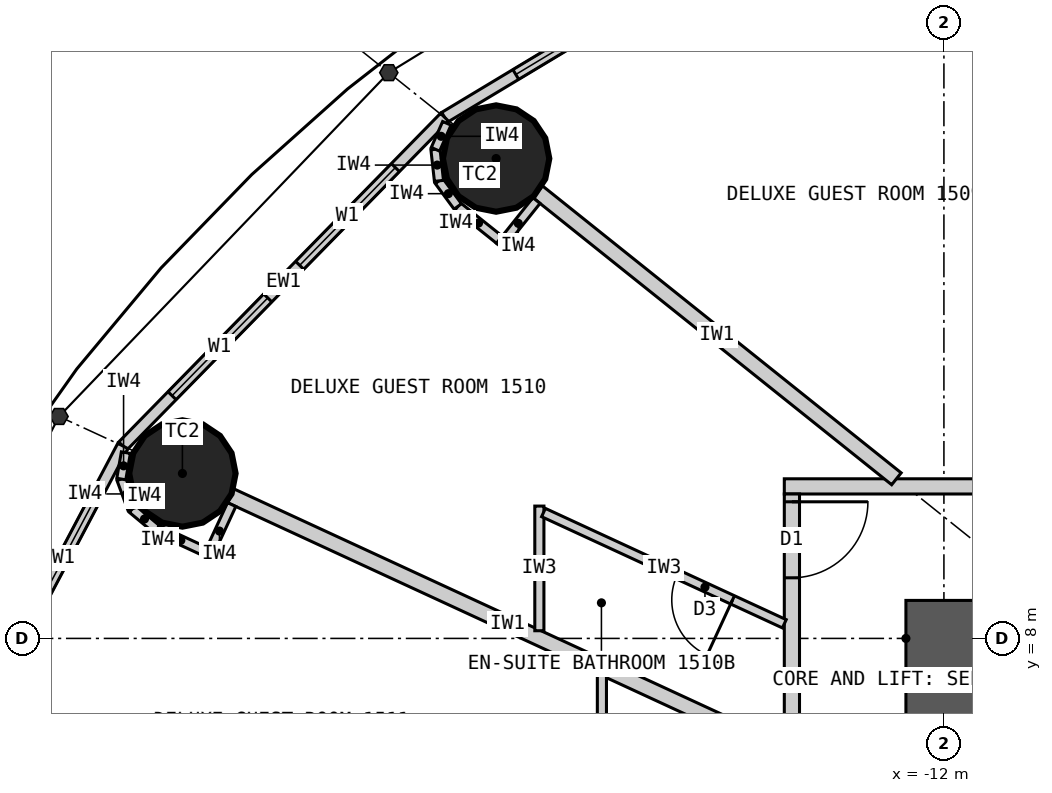
"""IFC4 building model, lengths in metres.
Left out: names, types, materials, properties, quantities, classifications, styles, units other than length and angle.
Written with IfcOpenShell. Run it as: python <this file> out.ifc"""

import sys

from ifc_helpers import new_model, si_unit, direction, frame, frame_2d, origin, origin_2d, place, context, subcontext, project, spatial, rectangle, circle, extrude, element, fill, save


model = new_model("IFC4")
c1 = context("Model", 3, precision=1e-05, world=origin(), true_north=direction((0.0, 1.0)))
c2 = subcontext(c1, "Body", "Model", "MODEL_VIEW")
j1 = project(units=[si_unit("LENGTHUNIT", "METRE"), si_unit("PLANEANGLEUNIT", "RADIAN")], contexts=[c1])
p1 = place(None, origin())
s1 = spatial("IfcSite", under=j1, at=p1, CompositionType="ELEMENT")
p2 = place(p1, origin())
s2 = spatial("IfcBuilding", under=s1, at=p2, CompositionType="ELEMENT")
p3 = place(p2, frame((0.0, 0.0, 63.9)))
s3 = spatial("IfcBuildingStorey", under=s2, at=p3, CompositionType="ELEMENT", Elevation=63.9)
for number, where, z_axis, x_axis in (
    (1, (-17.892, 14.313, 0.0), (0.0, 0.0, 1.0), (1.0, 0.0, 0.0)),
    (2, (-22.019, 10.17, 0.0), (0.0, 0.0, 1.0), (1.0, 0.0, 0.0)),
):
    element("IfcColumn", number, at=place(p3, frame(where, z_axis=z_axis, x_axis=x_axis)), inside=s3, PredefinedType="COLUMN", context=c2, shape_type="SweptSolid", body=[
        extrude(circle(Radius=0.7, at=origin_2d()), origin(), (0.0, 0.0, 1.0), 3.3),
    ])
p4 = place(p3, frame((-12.5, 8.0, 0.0), z_axis=(0.0, 0.0, 1.0), x_axis=(1.0, 0.0, 0.0)))
e3 = element("IfcWall", 3, at=p4, inside=s3, PredefinedType="SHEAR", context=c2, shape_type="SweptSolid", body=[
    extrude(rectangle(XDim=25.0, YDim=1.0, at=frame_2d((12.5, 0.0))), origin(), (0.0, 0.0, 1.0), 3.3),
])
p5 = place(p4, frame((11.2, 0.0, 0.0)))
e4 = element("IfcOpeningElement", 4, at=p5, cuts=e3, PredefinedType="OPENING", context=c2, shape_type="SweptSolid", body=[
    extrude(rectangle(XDim=1.2, YDim=2.2, at=frame_2d((0.6, 1.1))), frame((0.0, 0.51, 0.0), z_axis=(0.0, -1.0, 0.0), x_axis=(1.0, 0.0, 0.0)), (0.0, 0.0, 1.0), 1.02),
])
p6 = place(p4, frame((18.8, 0.0, 0.0)))
e5 = element("IfcOpeningElement", 5, at=p6, cuts=e3, PredefinedType="OPENING", context=c2, shape_type="SweptSolid", body=[
    extrude(rectangle(XDim=0.9, YDim=2.2, at=frame_2d((0.45, 1.1))), frame((0.0, 0.51, 0.0), z_axis=(0.0, -1.0, 0.0), x_axis=(1.0, 0.0, 0.0)), (0.0, 0.0, 1.0), 1.02),
])
p7 = place(p3, frame((-12.0, 7.5, 0.0), z_axis=(0.0, 0.0, 1.0), x_axis=(0.0, -1.0, 0.0)))
e6 = element("IfcWall", 6, at=p7, inside=s3, PredefinedType="SHEAR", context=c2, shape_type="SweptSolid", body=[
    extrude(rectangle(XDim=15.0, YDim=1.0, at=frame_2d((7.5, 0.0))), origin(), (0.0, 0.0, 1.0), 3.3),
])
p8 = place(p7, frame((6.6, 0.0, 0.0)))
e7 = element("IfcOpeningElement", 7, at=p8, cuts=e6, PredefinedType="OPENING", context=c2, shape_type="SweptSolid", body=[
    extrude(rectangle(XDim=1.8, YDim=2.2, at=frame_2d((0.9, 1.1))), frame((0.0, 0.51, 0.0), z_axis=(0.0, -1.0, 0.0), x_axis=(1.0, 0.0, 0.0)), (0.0, 0.0, 1.0), 1.02),
])
p9 = place(p3, frame((-13.096, 18.147, 0.0), z_axis=(0.0, 0.0, 1.0), x_axis=(-0.856983180864, -0.515344377787, 0.0)))
e8 = element("IfcWall", 8, at=p9, inside=s3, PredefinedType="ELEMENTEDWALL", context=c2, shape_type="SweptSolid", body=[
    extrude(rectangle(XDim=6.386, YDim=0.15, at=frame_2d((3.193, 0.0))), origin(), (0.0, 0.0, 1.0), 3.12),
])
p10 = place(p9, frame((1.093, 0.0, 0.9)))
e9 = element("IfcOpeningElement", 9, at=p10, cuts=e8, PredefinedType="OPENING", context=c2, shape_type="SweptSolid", body=[
    extrude(rectangle(XDim=1.8, YDim=1.9, at=frame_2d((0.9, 0.95))), frame((0.0, 0.085, 0.0), z_axis=(0.0, -1.0, 0.0), x_axis=(1.0, 0.0, 0.0)), (0.0, 0.0, 1.0), 0.17),
])
p11 = place(p9, frame((3.493, 0.0, 0.9)))
e10 = element("IfcOpeningElement", 10, at=p11, cuts=e8, PredefinedType="OPENING", context=c2, shape_type="SweptSolid", body=[
    extrude(rectangle(XDim=1.8, YDim=1.9, at=frame_2d((0.9, 0.95))), frame((0.0, 0.085, 0.0), z_axis=(0.0, -1.0, 0.0), x_axis=(1.0, 0.0, 0.0)), (0.0, 0.0, 1.0), 0.17),
])
p12 = place(p3, frame((-18.57, 14.856, 0.0), z_axis=(0.0, 0.0, 1.0), x_axis=(-0.699602905915, -0.714531856557, 0.0)))
e11 = element("IfcWall", 11, at=p12, inside=s3, PredefinedType="ELEMENTEDWALL", context=c2, shape_type="SweptSolid", body=[
    extrude(rectangle(XDim=6.051, YDim=0.15, at=frame_2d((3.025, 0.0))), origin(), (0.0, 0.0, 1.0), 3.12),
])
p13 = place(p12, frame((0.926, 0.0, 0.9)))
e12 = element("IfcOpeningElement", 12, at=p13, cuts=e11, PredefinedType="OPENING", context=c2, shape_type="SweptSolid", body=[
    extrude(rectangle(XDim=1.8, YDim=1.9, at=frame_2d((0.9, 0.95))), frame((0.0, 0.085, 0.0), z_axis=(0.0, -1.0, 0.0), x_axis=(1.0, 0.0, 0.0)), (0.0, 0.0, 1.0), 0.17),
])
p14 = place(p12, frame((3.325, 0.0, 0.9)))
e13 = element("IfcOpeningElement", 13, at=p14, cuts=e11, PredefinedType="OPENING", context=c2, shape_type="SweptSolid", body=[
    extrude(rectangle(XDim=1.8, YDim=1.9, at=frame_2d((0.9, 0.95))), frame((0.0, 0.085, 0.0), z_axis=(0.0, -1.0, 0.0), x_axis=(1.0, 0.0, 0.0)), (0.0, 0.0, 1.0), 0.17),
])
p15 = place(p3, frame((-22.803, 10.532, 0.0), z_axis=(0.0, 0.0, 1.0), x_axis=(-0.467296867008, -0.884100468321, 0.0)))
e14 = element("IfcWall", 14, at=p15, inside=s3, PredefinedType="ELEMENTEDWALL", context=c2, shape_type="SweptSolid", body=[
    extrude(rectangle(XDim=5.734, YDim=0.15, at=frame_2d((2.867, 0.0))), origin(), (0.0, 0.0, 1.0), 3.12),
])
p16 = place(p15, frame((0.767, 0.0, 0.9)))
e15 = element("IfcOpeningElement", 15, at=p16, cuts=e14, PredefinedType="OPENING", context=c2, shape_type="SweptSolid", body=[
    extrude(rectangle(XDim=1.8, YDim=1.9, at=frame_2d((0.9, 0.95))), frame((0.0, 0.085, 0.0), z_axis=(0.0, -1.0, 0.0), x_axis=(1.0, 0.0, 0.0)), (0.0, 0.0, 1.0), 0.17),
])
p17 = place(p15, frame((3.167, 0.0, 0.9)))
e16 = element("IfcOpeningElement", 16, at=p17, cuts=e14, PredefinedType="OPENING", context=c2, shape_type="SweptSolid", body=[
    extrude(rectangle(XDim=1.8, YDim=1.9, at=frame_2d((0.9, 0.95))), frame((0.0, 0.085, 0.0), z_axis=(0.0, -1.0, 0.0), x_axis=(1.0, 0.0, 0.0)), (0.0, 0.0, 1.0), 0.17),
])
p18 = place(p3, frame((-14.1, 10.0, 0.0), z_axis=(0.0, 0.0, 1.0), x_axis=(1.0, 0.0, 0.0)))
e17 = element("IfcWall", 17, at=p18, inside=s3, PredefinedType="PARTITIONING", context=c2, shape_type="SweptSolid", body=[
    extrude(rectangle(XDim=28.2, YDim=0.2, at=frame_2d((14.1, 0.0))), origin(), (0.0, 0.0, 1.0), 3.12),
])
p19 = place(p18, frame((18.529, 0.0, 0.0)))
e18 = element("IfcOpeningElement", 18, at=p19, cuts=e17, PredefinedType="OPENING", context=c2, shape_type="SweptSolid", body=[
    extrude(rectangle(XDim=1.0, YDim=2.2, at=frame_2d((0.5, 1.1))), frame((0.0, 0.11, 0.0), z_axis=(0.0, -1.0, 0.0), x_axis=(1.0, 0.0, 0.0)), (0.0, 0.0, 1.0), 0.22),
])
p20 = place(p18, frame((14.623, 0.0, 0.0)))
e19 = element("IfcOpeningElement", 19, at=p20, cuts=e17, PredefinedType="OPENING", context=c2, shape_type="SweptSolid", body=[
    extrude(rectangle(XDim=1.0, YDim=2.2, at=frame_2d((0.5, 1.1))), frame((0.0, 0.11, 0.0), z_axis=(0.0, -1.0, 0.0), x_axis=(1.0, 0.0, 0.0)), (0.0, 0.0, 1.0), 0.22),
])
p21 = place(p18, frame((11.24, 0.0, 0.0)))
e20 = element("IfcOpeningElement", 20, at=p21, cuts=e17, PredefinedType="OPENING", context=c2, shape_type="SweptSolid", body=[
    extrude(rectangle(XDim=1.0, YDim=2.2, at=frame_2d((0.5, 1.1))), frame((0.0, 0.11, 0.0), z_axis=(0.0, -1.0, 0.0), x_axis=(1.0, 0.0, 0.0)), (0.0, 0.0, 1.0), 0.22),
])
p22 = place(p18, frame((8.671, 0.0, 0.0)))
e21 = element("IfcOpeningElement", 21, at=p22, cuts=e17, PredefinedType="OPENING", context=c2, shape_type="SweptSolid", body=[
    extrude(rectangle(XDim=1.0, YDim=2.2, at=frame_2d((0.5, 1.1))), frame((0.0, 0.11, 0.0), z_axis=(0.0, -1.0, 0.0), x_axis=(1.0, 0.0, 0.0)), (0.0, 0.0, 1.0), 0.22),
])
p23 = place(p18, frame((2.801, 0.0, 0.0)))
e22 = element("IfcOpeningElement", 22, at=p23, cuts=e17, PredefinedType="OPENING", context=c2, shape_type="SweptSolid", body=[
    extrude(rectangle(XDim=1.0, YDim=2.2, at=frame_2d((0.5, 1.1))), frame((0.0, 0.11, 0.0), z_axis=(0.0, -1.0, 0.0), x_axis=(1.0, 0.0, 0.0)), (0.0, 0.0, 1.0), 0.22),
])
p24 = place(p3, frame((-14.0, 9.9, 0.0), z_axis=(0.0, 0.0, 1.0), x_axis=(0.0, -1.0, 0.0)))
e23 = element("IfcWall", 23, at=p24, inside=s3, PredefinedType="PARTITIONING", context=c2, shape_type="SweptSolid", body=[
    extrude(rectangle(XDim=19.8, YDim=0.2, at=frame_2d((9.9, 0.0))), origin(), (0.0, 0.0, 1.0), 3.12),
])
p25 = place(p24, frame((0.103, 0.0, 0.0)))
e24 = element("IfcOpeningElement", 24, at=p25, cuts=e23, PredefinedType="OPENING", context=c2, shape_type="SweptSolid", body=[
    extrude(rectangle(XDim=1.0, YDim=2.2, at=frame_2d((0.5, 1.1))), frame((0.0, 0.11, 0.0), z_axis=(0.0, -1.0, 0.0), x_axis=(1.0, 0.0, 0.0)), (0.0, 0.0, 1.0), 0.22),
])
p26 = place(p24, frame((5.248, 0.0, 0.0)))
e25 = element("IfcOpeningElement", 25, at=p26, cuts=e23, PredefinedType="OPENING", context=c2, shape_type="SweptSolid", body=[
    extrude(rectangle(XDim=1.0, YDim=2.2, at=frame_2d((0.5, 1.1))), frame((0.0, 0.11, 0.0), z_axis=(0.0, -1.0, 0.0), x_axis=(1.0, 0.0, 0.0)), (0.0, 0.0, 1.0), 0.22),
])
p27 = place(p24, frame((9.438, 0.0, 0.0)))
e26 = element("IfcOpeningElement", 26, at=p27, cuts=e23, PredefinedType="OPENING", context=c2, shape_type="SweptSolid", body=[
    extrude(rectangle(XDim=1.0, YDim=2.2, at=frame_2d((0.5, 1.1))), frame((0.0, 0.11, 0.0), z_axis=(0.0, -1.0, 0.0), x_axis=(1.0, 0.0, 0.0)), (0.0, 0.0, 1.0), 0.22),
])
p28 = place(p24, frame((13.942, 0.0, 0.0)))
e27 = element("IfcOpeningElement", 27, at=p28, cuts=e23, PredefinedType="OPENING", context=c2, shape_type="SweptSolid", body=[
    extrude(rectangle(XDim=1.0, YDim=2.2, at=frame_2d((0.5, 1.1))), frame((0.0, 0.11, 0.0), z_axis=(0.0, -1.0, 0.0), x_axis=(1.0, 0.0, 0.0)), (0.0, 0.0, 1.0), 0.22),
])
p29 = place(p24, frame((18.698, 0.0, 0.0)))
e28 = element("IfcOpeningElement", 28, at=p29, cuts=e23, PredefinedType="OPENING", context=c2, shape_type="SweptSolid", body=[
    extrude(rectangle(XDim=1.0, YDim=2.2, at=frame_2d((0.5, 1.1))), frame((0.0, 0.11, 0.0), z_axis=(0.0, -1.0, 0.0), x_axis=(1.0, 0.0, 0.0)), (0.0, 0.0, 1.0), 0.22),
])
p30 = place(p3, frame((-7.289, 10.1, 0.0), z_axis=(0.0, 0.0, 1.0), x_axis=(-0.585198353053, 0.810890182197, 0.0)))
e29 = element("IfcWall", 29, at=p30, inside=s3, PredefinedType="PARTITIONING", context=c2, shape_type="SweptSolid", body=[
    extrude(rectangle(XDim=8.36, YDim=0.2, at=frame_2d((4.18, 0.0))), origin(), (0.0, 0.0, 1.0), 2.32),
])
p31 = place(p3, frame((-12.625, 10.1, 0.0), z_axis=(0.0, 0.0, 1.0), x_axis=(-0.780892451574, 0.624665493744, 0.0)))
e30 = element("IfcWall", 30, at=p31, inside=s3, PredefinedType="PARTITIONING", context=c2, shape_type="SweptSolid", body=[
    extrude(rectangle(XDim=6.045, YDim=0.2, at=frame_2d((3.022, 0.0))), origin(), (0.0, 0.0, 1.0), 2.32),
])
p32 = place(p3, frame((-14.1, 6.512, 0.0), z_axis=(0.0, 0.0, 1.0), x_axis=(-0.907832871056, 0.419332181247, 0.0)))
e31 = element("IfcWall", 31, at=p32, inside=s3, PredefinedType="PARTITIONING", context=c2, shape_type="SweptSolid", body=[
    extrude(rectangle(XDim=8.023, YDim=0.2, at=frame_2d((4.011, 0.0))), origin(), (0.0, 0.0, 1.0), 2.32),
])
p33 = place(p3, frame((-17.323, 8.101, 0.0), z_axis=(0.0, 0.0, 1.0), x_axis=(0.0, 1.0, 0.0)))
e32 = element("IfcWall", 32, at=p33, inside=s3, PredefinedType="PARTITIONING", context=c2, shape_type="SweptSolid", body=[
    extrude(rectangle(XDim=1.64, YDim=0.12, at=frame_2d((0.82, 0.0))), origin(), (0.0, 0.0, 1.0), 3.12),
])
p34 = place(p3, frame((-14.1, 8.193, 0.0), z_axis=(0.0, 0.0, 1.0), x_axis=(-0.907836493557, 0.419324338628, 0.0)))
e33 = element("IfcWall", 33, at=p34, inside=s3, PredefinedType="PARTITIONING", context=c2, shape_type="SweptSolid", body=[
    extrude(rectangle(XDim=3.49, YDim=0.12, at=frame_2d((1.745, 0.0))), origin(), (0.0, 0.0, 1.0), 3.12),
])
p35 = place(p34, frame((0.75, 0.0, 0.0)))
e34 = element("IfcOpeningElement", 34, at=p35, cuts=e33, PredefinedType="OPENING", context=c2, shape_type="SweptSolid", body=[
    extrude(rectangle(XDim=0.8, YDim=2.1, at=frame_2d((0.4, 1.05))), frame((0.0, 0.07, 0.0), z_axis=(0.0, -1.0, 0.0), x_axis=(1.0, 0.0, 0.0)), (0.0, 0.0, 1.0), 0.14),
])
p36 = place(p3, frame((-16.5, 7.521, 0.0), z_axis=(0.0, 0.0, 1.0), x_axis=(0.0, -1.0, 0.0)))
e35 = element("IfcWall", 35, at=p36, inside=s3, PredefinedType="PARTITIONING", context=c2, shape_type="SweptSolid", body=[
    extrude(rectangle(XDim=2.749, YDim=0.12, at=frame_2d((1.374, 0.0))), origin(), (0.0, 0.0, 1.0), 3.12),
])
p37 = place(p3, frame((-17.361, 13.76, 0.0), z_axis=(0.0, 0.0, 1.0), x_axis=(-0.624501042889, -0.781023973659, 0.0)))
e36 = element("IfcWall", 36, at=p37, inside=s3, PredefinedType="PARTITIONING", context=c2, shape_type="SweptSolid", body=[
    extrude(rectangle(XDim=0.767, YDim=0.12, at=frame_2d((0.384, 0.0))), origin(), (0.0, 0.0, 1.0), 3.12),
])
p38 = place(p3, frame((-17.85, 13.246, 0.0), z_axis=(0.0, 0.0, 1.0), x_axis=(-0.780902834923, 0.62465251333, 0.0)))
e37 = element("IfcWall", 37, at=p38, inside=s3, PredefinedType="PARTITIONING", context=c2, shape_type="SweptSolid", body=[
    extrude(rectangle(XDim=0.7, YDim=0.12, at=frame_2d((0.35, 0.0))), origin(), (0.0, 0.0, 1.0), 3.12),
])
for number, where, z_axis, x_axis in (
    (38, (-18.396, 13.683, 0.0), (0.0, 0.0, 1.0), (-0.592, 0.806, 0.0)),
    (39, (-18.644, 14.02, 0.0), (0.0, 0.0, 1.0), (-0.11, 0.994, 0.0)),
):
    element("IfcWall", number, at=place(p3, frame(where, z_axis=z_axis, x_axis=x_axis)), inside=s3, PredefinedType="PARTITIONING", context=c2, shape_type="SweptSolid", body=[
        extrude(rectangle(XDim=0.418, YDim=0.12, at=frame_2d((0.209, 0.0))), origin(), (0.0, 0.0, 1.0), 3.12),
    ])
p39 = place(p3, frame((-18.69, 14.435, 0.0), z_axis=(0.0, 0.0, 1.0), x_axis=(0.401093412634, 0.91603715773, 0.0)))
e40 = element("IfcWall", 40, at=p39, inside=s3, PredefinedType="PARTITIONING", context=c2, shape_type="SweptSolid", body=[
    extrude(rectangle(XDim=0.373, YDim=0.12, at=frame_2d((0.187, 0.0))), origin(), (0.0, 0.0, 1.0), 3.12),
])
p40 = place(p3, frame((-21.371, 9.761, 0.0), z_axis=(0.0, 0.0, 1.0), x_axis=(-0.419259891039, -0.907866258744, 0.0)))
e41 = element("IfcWall", 41, at=p40, inside=s3, PredefinedType="PARTITIONING", context=c2, shape_type="SweptSolid", body=[
    extrude(rectangle(XDim=0.768, YDim=0.12, at=frame_2d((0.384, 0.0))), origin(), (0.0, 0.0, 1.0), 3.12),
])
p41 = place(p3, frame((-21.722, 9.144, 0.0), z_axis=(0.0, 0.0, 1.0), x_axis=(-0.907877701396, 0.419235112208, 0.0)))
e42 = element("IfcWall", 42, at=p41, inside=s3, PredefinedType="PARTITIONING", context=c2, shape_type="SweptSolid", body=[
    extrude(rectangle(XDim=0.7, YDim=0.12, at=frame_2d((0.35, 0.0))), origin(), (0.0, 0.0, 1.0), 3.12),
])
p42 = place(p3, frame((-22.358, 9.437, 0.0), z_axis=(0.0, 0.0, 1.0), x_axis=(-0.768412687942, 0.639954639806, 0.0)))
e43 = element("IfcWall", 43, at=p42, inside=s3, PredefinedType="PARTITIONING", context=c2, shape_type="SweptSolid", body=[
    extrude(rectangle(XDim=0.418, YDim=0.12, at=frame_2d((0.209, 0.0))), origin(), (0.0, 0.0, 1.0), 3.12),
])
p43 = place(p3, frame((-22.679, 9.705, 0.0), z_axis=(0.0, 0.0, 1.0), x_axis=(-0.345164001646, 0.938542386879, 0.0)))
e44 = element("IfcWall", 44, at=p43, inside=s3, PredefinedType="PARTITIONING", context=c2, shape_type="SweptSolid", body=[
    extrude(rectangle(XDim=0.418, YDim=0.12, at=frame_2d((0.209, 0.0))), origin(), (0.0, 0.0, 1.0), 3.12),
])
p44 = place(p3, frame((-22.823, 10.097, 0.0), z_axis=(0.0, 0.0, 1.0), x_axis=(0.169674995186, 0.985500074079, 0.0)))
e45 = element("IfcWall", 45, at=p44, inside=s3, PredefinedType="PARTITIONING", context=c2, shape_type="SweptSolid", body=[
    extrude(rectangle(XDim=0.353, YDim=0.12, at=frame_2d((0.176, 0.0))), origin(), (0.0, 0.0, 1.0), 3.12),
])
p45 = place(p11, origin())
e46 = element("IfcWindow", 46, at=p45, inside=s3, PartitioningType="SINGLE_PANEL", PredefinedType="WINDOW", context=c2, shape_type="SweptSolid", body=[
    extrude(rectangle(XDim=1.8, YDim=1.9, at=frame_2d((0.9, 0.95))), frame((0.0, 0.03, 0.0), z_axis=(0.0, -1.0, 0.0), x_axis=(1.0, 0.0, 0.0)), (0.0, 0.0, 1.0), 0.06),
])
fill(e10, e46)
p46 = place(p13, origin())
e47 = element("IfcWindow", 47, at=p46, inside=s3, PartitioningType="SINGLE_PANEL", PredefinedType="WINDOW", context=c2, shape_type="SweptSolid", body=[
    extrude(rectangle(XDim=1.8, YDim=1.9, at=frame_2d((0.9, 0.95))), frame((0.0, 0.03, 0.0), z_axis=(0.0, -1.0, 0.0), x_axis=(1.0, 0.0, 0.0)), (0.0, 0.0, 1.0), 0.06),
])
fill(e12, e47)
p47 = place(p14, origin())
e48 = element("IfcWindow", 48, at=p47, inside=s3, PartitioningType="SINGLE_PANEL", PredefinedType="WINDOW", context=c2, shape_type="SweptSolid", body=[
    extrude(rectangle(XDim=1.8, YDim=1.9, at=frame_2d((0.9, 0.95))), frame((0.0, 0.03, 0.0), z_axis=(0.0, -1.0, 0.0), x_axis=(1.0, 0.0, 0.0)), (0.0, 0.0, 1.0), 0.06),
])
fill(e13, e48)
p48 = place(p16, origin())
e49 = element("IfcWindow", 49, at=p48, inside=s3, PartitioningType="SINGLE_PANEL", PredefinedType="WINDOW", context=c2, shape_type="SweptSolid", body=[
    extrude(rectangle(XDim=1.8, YDim=1.9, at=frame_2d((0.9, 0.95))), frame((0.0, 0.03, 0.0), z_axis=(0.0, -1.0, 0.0), x_axis=(1.0, 0.0, 0.0)), (0.0, 0.0, 1.0), 0.06),
])
fill(e15, e49)
p49 = place(p35, origin())
e50 = element("IfcDoor", 50, at=p49, inside=s3, OperationType="SINGLE_SWING_LEFT", PredefinedType="DOOR", context=c2, shape_type="SweptSolid", body=[
    extrude(rectangle(XDim=0.8, YDim=2.1, at=frame_2d((0.4, 1.05))), frame((0.0, 0.025, 0.0), z_axis=(0.0, -1.0, 0.0), x_axis=(1.0, 0.0, 0.0)), (0.0, 0.0, 1.0), 0.05),
])
fill(e34, e50)
p50 = place(p25, origin())
e51 = element("IfcDoor", 51, at=p50, inside=s3, OperationType="SINGLE_SWING_LEFT", PredefinedType="DOOR", context=c2, shape_type="SweptSolid", body=[
    extrude(rectangle(XDim=1.0, YDim=2.2, at=frame_2d((0.5, 1.1))), frame((0.0, 0.025, 0.0), z_axis=(0.0, -1.0, 0.0), x_axis=(1.0, 0.0, 0.0)), (0.0, 0.0, 1.0), 0.05),
])
fill(e24, e51)
save(model, sys.argv[1])
